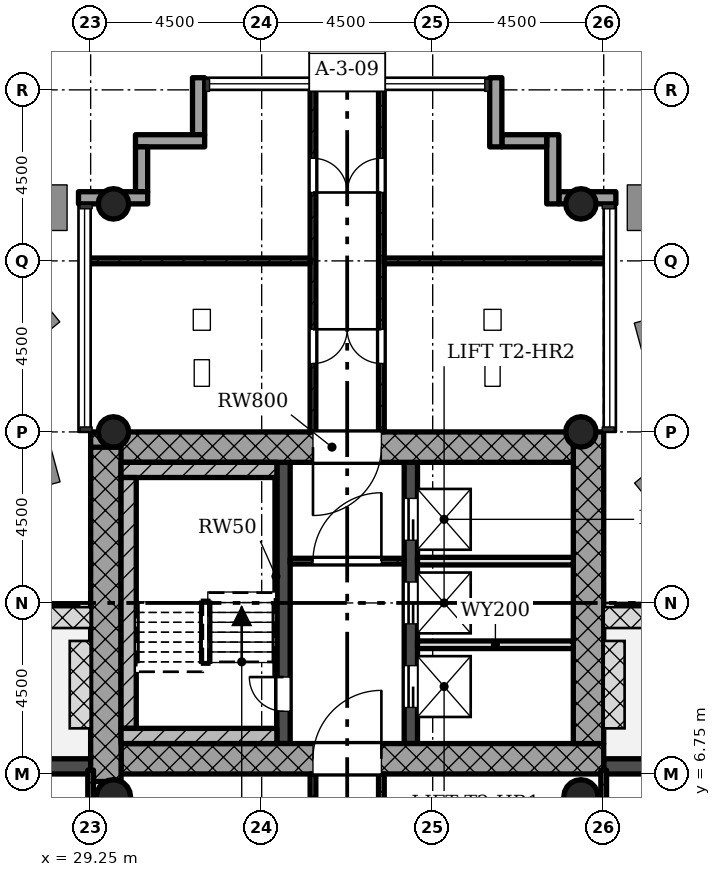
"""IFC4 building model, lengths in metres.
Left out: names, types, materials, properties, quantities, classifications, styles, units other than length and angle.
Written with IfcOpenShell. Run it as: python <this file> out.ifc"""

import sys

from ifc_helpers import new_model, si_unit, direction, frame, frame_2d, origin, origin_2d, place, context, subcontext, project, spatial, rectangle, hollow_circle, extrude, element, fill, save


model = new_model("IFC4")
c1 = context("Model", 3, precision=1e-05, world=origin(), true_north=direction((0.0, 1.0)))
c2 = subcontext(c1, "Body", "Model", "MODEL_VIEW")
j1 = project(units=[si_unit("LENGTHUNIT", "METRE"), si_unit("PLANEANGLEUNIT", "RADIAN")], contexts=[c1])
p1 = place(None, origin())
s1 = spatial("IfcSite", under=j1, at=p1, CompositionType="ELEMENT")
p2 = place(p1, origin())
s2 = spatial("IfcBuilding", under=s1, at=p2, CompositionType="ELEMENT")
p3 = place(p2, frame((0.0, 0.0, 128.7)))
s3 = spatial("IfcBuildingStorey", under=s2, at=p3, CompositionType="ELEMENT", Elevation=128.7)
p4 = place(p3, frame((30.05, 7.15, 0.0), z_axis=(0.0, 0.0, 1.0), x_axis=(1.0, 0.0, 0.0)))
e1 = element("IfcWall", 1, at=p4, inside=s3, PredefinedType="SHEAR", context=c2, shape_type="SweptSolid", body=[
    extrude(rectangle(XDim=12.7, YDim=0.8, at=frame_2d((6.35, 0.0))), origin(), (0.0, 0.0, 1.0), 5.0),
])
p5 = place(p4, frame((5.05, 0.0, 0.0)))
e2 = element("IfcOpeningElement", 2, at=p5, cuts=e1, PredefinedType="OPENING", context=c2, shape_type="SweptSolid", body=[
    extrude(rectangle(XDim=1.8, YDim=2.1, at=frame_2d((0.9, 1.05))), frame((0.0, 0.41, 0.0), z_axis=(0.0, -1.0, 0.0), x_axis=(1.0, 0.0, 0.0)), (0.0, 0.0, 1.0), 0.82),
])
p6 = place(p3, frame((42.35, 7.55, 0.0), z_axis=(0.0, 0.0, 1.0), x_axis=(0.0, 1.0, 0.0)))
e3 = element("IfcWall", 3, at=p6, inside=s3, PredefinedType="SHEAR", context=c2, shape_type="SweptSolid", body=[
    extrude(rectangle(XDim=8.2, YDim=0.8, at=frame_2d((4.1, 0.0))), origin(), (0.0, 0.0, 1.0), 5.0),
])
p7 = place(p3, frame((41.95, 15.35, 0.0), z_axis=(0.0, 0.0, 1.0), x_axis=(-1.0, 0.0, 0.0)))
e4 = element("IfcWall", 4, at=p7, inside=s3, PredefinedType="SHEAR", context=c2, shape_type="SweptSolid", body=[
    extrude(rectangle(XDim=12.7, YDim=0.8, at=frame_2d((6.35, 0.0))), origin(), (0.0, 0.0, 1.0), 5.0),
])
p8 = place(p7, frame((5.05, 0.0, 0.0)))
e5 = element("IfcOpeningElement", 5, at=p8, cuts=e4, PredefinedType="OPENING", context=c2, shape_type="SweptSolid", body=[
    extrude(rectangle(XDim=1.8, YDim=2.1, at=frame_2d((0.9, 1.05))), frame((0.0, 0.41, 0.0), z_axis=(0.0, -1.0, 0.0), x_axis=(1.0, 0.0, 0.0)), (0.0, 0.0, 1.0), 0.82),
])
p9 = place(p3, frame((29.65, 15.348, 0.0), z_axis=(0.0, 0.0, 1.0), x_axis=(0.0, -1.0, 0.0)))
e6 = element("IfcWall", 6, at=p9, inside=s3, PredefinedType="SHEAR", context=c2, shape_type="SweptSolid", body=[
    extrude(rectangle(XDim=8.796, YDim=0.8, at=frame_2d((4.398, 0.0))), origin(), (0.0, 0.0, 1.0), 5.0),
])
p10 = place(p3, frame((34.325, 7.55, 0.0), z_axis=(0.0, 0.0, 1.0), x_axis=(0.0, 1.0, 0.0)))
e7 = element("IfcWall", 7, at=p10, inside=s3, PredefinedType="SHEAR", context=c2, shape_type="SweptSolid", body=[
    extrude(rectangle(XDim=7.4, YDim=0.35, at=frame_2d((3.7, 0.0))), origin(), (0.0, 0.0, 1.0), 5.0),
])
p11 = place(p10, frame((0.85, 0.0, 0.0)))
e8 = element("IfcOpeningElement", 8, at=p11, cuts=e7, PredefinedType="OPENING", context=c2, shape_type="SweptSolid", body=[
    extrude(rectangle(XDim=0.9, YDim=2.1, at=frame_2d((0.45, 1.05))), frame((0.0, 0.185, 0.0), z_axis=(0.0, -1.0, 0.0), x_axis=(1.0, 0.0, 0.0)), (0.0, 0.0, 1.0), 0.37),
])
p12 = place(p3, frame((37.675, 7.55, 0.0), z_axis=(0.0, 0.0, 1.0), x_axis=(0.0, 1.0, 0.0)))
e9 = element("IfcWall", 9, at=p12, inside=s3, PredefinedType="SHEAR", context=c2, shape_type="SweptSolid", body=[
    extrude(rectangle(XDim=7.4, YDim=0.35, at=frame_2d((3.7, 0.0))), origin(), (0.0, 0.0, 1.0), 5.0),
])
p13 = place(p12, frame((0.95, 0.0, 0.0)))
e10 = element("IfcOpeningElement", 10, at=p13, cuts=e9, PredefinedType="OPENING", context=c2, shape_type="SweptSolid", body=[
    extrude(rectangle(XDim=1.1, YDim=2.1, at=frame_2d((0.55, 1.05))), frame((0.0, 0.185, 0.0), z_axis=(0.0, -1.0, 0.0), x_axis=(1.0, 0.0, 0.0)), (0.0, 0.0, 1.0), 0.37),
])
p14 = place(p12, frame((3.15, 0.0, 0.0)))
e11 = element("IfcOpeningElement", 11, at=p14, cuts=e9, PredefinedType="OPENING", context=c2, shape_type="SweptSolid", body=[
    extrude(rectangle(XDim=1.1, YDim=2.1, at=frame_2d((0.55, 1.05))), frame((0.0, 0.185, 0.0), z_axis=(0.0, -1.0, 0.0), x_axis=(1.0, 0.0, 0.0)), (0.0, 0.0, 1.0), 0.37),
])
p15 = place(p12, frame((5.35, 0.0, 0.0)))
e12 = element("IfcOpeningElement", 12, at=p15, cuts=e9, PredefinedType="OPENING", context=c2, shape_type="SweptSolid", body=[
    extrude(rectangle(XDim=1.1, YDim=2.1, at=frame_2d((0.55, 1.05))), frame((0.0, 0.185, 0.0), z_axis=(0.0, -1.0, 0.0), x_axis=(1.0, 0.0, 0.0)), (0.0, 0.0, 1.0), 0.37),
])
for number, where, z_axis, x_axis in (
    (13, (42.15, 15.75, 0.0), (0.0, 0.0, 1.0), (1.0, 0.0, 0.0)),
    (14, (29.85, 15.75, 0.0), (0.0, 0.0, 1.0), (1.0, 0.0, 0.0)),
    (15, (42.15, 21.75, 0.0), (0.0, 0.0, 1.0), (1.0, 0.0, 0.0)),
    (16, (29.85, 21.75, 0.0), (0.0, 0.0, 1.0), (1.0, 0.0, 0.0)),
):
    element("IfcColumn", number, at=place(p3, frame(where, z_axis=z_axis, x_axis=x_axis)), inside=s3, PredefinedType="COLUMN", context=c2, shape_type="SweptSolid", body=[
        extrude(hollow_circle(Radius=0.4, WallThickness=0.028, at=origin_2d()), origin(), (0.0, 0.0, 1.0), 5.0),
    ])
for number, where, z_axis, x_axis in (
    (17, (42.15, 6.15, 0.0), (0.0, 0.0, 1.0), (1.0, 0.0, 0.0)),
    (18, (29.85, 6.15, 0.0), (0.0, 0.0, 1.0), (1.0, 0.0, 0.0)),
):
    element("IfcColumn", number, at=place(p3, frame(where, z_axis=z_axis, x_axis=x_axis)), inside=s3, PredefinedType="COLUMN", context=c2, shape_type="SweptSolid", body=[
        extrude(hollow_circle(Radius=0.45, WallThickness=0.032, at=origin_2d()), origin(), (0.0, 0.0, 1.0), 5.0),
    ])
p16 = place(p3, frame((47.25, 6.95, -0.02), z_axis=(0.0, 0.0, 1.0), x_axis=(-1.0, 0.0, 0.0)))
e19 = element("IfcWall", 19, at=p16, inside=s3, PredefinedType="STANDARD", context=c2, shape_type="SweptSolid", body=[
    extrude(rectangle(XDim=4.5, YDim=0.4, at=frame_2d((2.25, 0.0))), origin(), (0.0, 0.0, 1.0), 4.72),
])
p17 = place(p16, frame((1.35, 0.0, 0.02)))
e20 = element("IfcOpeningElement", 20, at=p17, cuts=e19, PredefinedType="OPENING", context=c2, shape_type="SweptSolid", body=[
    extrude(rectangle(XDim=1.8, YDim=2.1, at=frame_2d((0.9, 1.05))), frame((0.0, 0.21, 0.0), z_axis=(0.0, -1.0, 0.0), x_axis=(1.0, 0.0, 0.0)), (0.0, 0.0, 1.0), 0.42),
])
p18 = place(p3, frame((43.07, 21.91, -0.3), z_axis=(0.0, 0.0, 1.0), x_axis=(-1.0, 0.0, 0.0)))
e21 = element("IfcWall", 21, at=p18, inside=s3, PredefinedType="STANDARD", context=c2, shape_type="SweptSolid", body=[
    extrude(rectangle(XDim=1.5, YDim=0.32, at=frame_2d((0.75, 0.0))), origin(), (0.0, 0.0, 1.0), 5.0),
])
p19 = place(p3, frame((41.41, 21.75, -0.3), z_axis=(0.0, 0.0, 1.0), x_axis=(0.0, 1.0, 0.0)))
e22 = element("IfcWall", 22, at=p19, inside=s3, PredefinedType="STANDARD", context=c2, shape_type="SweptSolid", body=[
    extrude(rectangle(XDim=1.82, YDim=0.32, at=frame_2d((0.91, 0.0))), origin(), (0.0, 0.0, 1.0), 5.0),
])
p20 = place(p3, frame((41.25, 23.41, -0.3), z_axis=(0.0, 0.0, 1.0), x_axis=(-1.0, 0.0, 0.0)))
e23 = element("IfcWall", 23, at=p20, inside=s3, PredefinedType="STANDARD", context=c2, shape_type="SweptSolid", body=[
    extrude(rectangle(XDim=1.18, YDim=0.32, at=frame_2d((0.59, 0.0))), origin(), (0.0, 0.0, 1.0), 5.0),
])
p21 = place(p3, frame((39.91, 23.25, -0.3), z_axis=(0.0, 0.0, 1.0), x_axis=(0.0, 1.0, 0.0)))
e24 = element("IfcWall", 24, at=p21, inside=s3, PredefinedType="STANDARD", context=c2, shape_type="SweptSolid", body=[
    extrude(rectangle(XDim=1.82, YDim=0.32, at=frame_2d((0.91, 0.0))), origin(), (0.0, 0.0, 1.0), 5.0),
])
p22 = place(p3, frame((32.09, 25.07, -0.3), z_axis=(0.0, 0.0, 1.0), x_axis=(0.0, -1.0, 0.0)))
e25 = element("IfcWall", 25, at=p22, inside=s3, PredefinedType="STANDARD", context=c2, shape_type="SweptSolid", body=[
    extrude(rectangle(XDim=1.5, YDim=0.32, at=frame_2d((0.75, 0.0))), origin(), (0.0, 0.0, 1.0), 5.0),
])
p23 = place(p3, frame((32.25, 23.41, -0.3), z_axis=(0.0, 0.0, 1.0), x_axis=(-1.0, 0.0, 0.0)))
e26 = element("IfcWall", 26, at=p23, inside=s3, PredefinedType="STANDARD", context=c2, shape_type="SweptSolid", body=[
    extrude(rectangle(XDim=1.82, YDim=0.32, at=frame_2d((0.91, 0.0))), origin(), (0.0, 0.0, 1.0), 5.0),
])
p24 = place(p3, frame((30.59, 23.25, -0.3), z_axis=(0.0, 0.0, 1.0), x_axis=(0.0, -1.0, 0.0)))
e27 = element("IfcWall", 27, at=p24, inside=s3, PredefinedType="STANDARD", context=c2, shape_type="SweptSolid", body=[
    extrude(rectangle(XDim=1.18, YDim=0.32, at=frame_2d((0.59, 0.0))), origin(), (0.0, 0.0, 1.0), 5.0),
])
p25 = place(p3, frame((30.75, 21.91, -0.3), z_axis=(0.0, 0.0, 1.0), x_axis=(-1.0, 0.0, 0.0)))
e28 = element("IfcWall", 28, at=p25, inside=s3, PredefinedType="STANDARD", context=c2, shape_type="SweptSolid", body=[
    extrude(rectangle(XDim=1.82, YDim=0.32, at=frame_2d((0.91, 0.0))), origin(), (0.0, 0.0, 1.0), 5.0),
])
p26 = place(p3, frame((29.25, 6.95, -0.02), z_axis=(0.0, 0.0, 1.0), x_axis=(-1.0, 0.0, 0.0)))
e29 = element("IfcWall", 29, at=p26, inside=s3, PredefinedType="STANDARD", context=c2, shape_type="SweptSolid", body=[
    extrude(rectangle(XDim=4.5, YDim=0.4, at=frame_2d((2.25, 0.0))), origin(), (0.0, 0.0, 1.0), 4.72),
])
p27 = place(p26, frame((1.35, 0.0, 0.02)))
e30 = element("IfcOpeningElement", 30, at=p27, cuts=e29, PredefinedType="OPENING", context=c2, shape_type="SweptSolid", body=[
    extrude(rectangle(XDim=1.8, YDim=2.1, at=frame_2d((0.9, 1.05))), frame((0.0, 0.21, 0.0), z_axis=(0.0, -1.0, 0.0), x_axis=(1.0, 0.0, 0.0)), (0.0, 0.0, 1.0), 0.42),
])
p28 = place(p3, frame((37.5, 12.35, 0.0), z_axis=(0.0, 0.0, 1.0), x_axis=(-1.0, 0.0, 0.0)))
e31 = element("IfcWall", 31, at=p28, inside=s3, PredefinedType="PARTITIONING", context=c2, shape_type="SweptSolid", body=[
    extrude(rectangle(XDim=3.0, YDim=0.15, at=frame_2d((1.5, 0.0))), origin(), (0.0, 0.0, 1.0), 4.58),
])
p29 = place(p28, frame((0.6, 0.0, 0.0)))
e32 = element("IfcOpeningElement", 32, at=p29, cuts=e31, PredefinedType="OPENING", context=c2, shape_type="SweptSolid", body=[
    extrude(rectangle(XDim=1.8, YDim=2.1, at=frame_2d((0.9, 1.05))), frame((0.0, 0.085, 0.0), z_axis=(0.0, -1.0, 0.0), x_axis=(1.0, 0.0, 0.0)), (0.0, 0.0, 1.0), 0.17),
])
for number, where, z_axis, x_axis in (
    (33, (41.95, 10.15, 0.0), (0.0, 0.0, 1.0), (-1.0, 0.0, 0.0)),
    (34, (41.95, 12.35, 0.0), (0.0, 0.0, 1.0), (-1.0, 0.0, 0.0)),
):
    element("IfcWall", number, at=place(p3, frame(where, z_axis=z_axis, x_axis=x_axis)), inside=s3, PredefinedType="SOLIDWALL", context=c2, shape_type="SweptSolid", body=[
        extrude(rectangle(XDim=4.1, YDim=0.2, at=frame_2d((2.05, 0.0))), origin(), (0.0, 0.0, 1.0), 4.58),
    ])
p30 = place(p3, frame((35.1, 0.9, 0.0), z_axis=(0.0, 0.0, 1.0), x_axis=(0.0, 1.0, 0.0)))
e35 = element("IfcWall", 35, at=p30, inside=s3, PredefinedType="PARTITIONING", context=c2, shape_type="SweptSolid", body=[
    extrude(rectangle(XDim=5.85, YDim=0.15, at=frame_2d((2.925, 0.0))), origin(), (0.0, 0.0, 1.0), 4.58),
])
p31 = place(p30, frame((2.475, 0.0, 0.0)))
e36 = element("IfcOpeningElement", 36, at=p31, cuts=e35, PredefinedType="OPENING", context=c2, shape_type="SweptSolid", body=[
    extrude(rectangle(XDim=0.9, YDim=2.1, at=frame_2d((0.45, 1.05))), frame((0.0, 0.085, 0.0), z_axis=(0.0, -1.0, 0.0), x_axis=(1.0, 0.0, 0.0)), (0.0, 0.0, 1.0), 0.17),
])
p32 = place(p3, frame((36.9, 0.9, 0.0), z_axis=(0.0, 0.0, 1.0), x_axis=(0.0, 1.0, 0.0)))
e37 = element("IfcWall", 37, at=p32, inside=s3, PredefinedType="PARTITIONING", context=c2, shape_type="SweptSolid", body=[
    extrude(rectangle(XDim=5.85, YDim=0.15, at=frame_2d((2.925, 0.0))), origin(), (0.0, 0.0, 1.0), 4.58),
])
p33 = place(p32, frame((2.475, 0.0, 0.0)))
e38 = element("IfcOpeningElement", 38, at=p33, cuts=e37, PredefinedType="OPENING", context=c2, shape_type="SweptSolid", body=[
    extrude(rectangle(XDim=0.9, YDim=2.1, at=frame_2d((0.45, 1.05))), frame((0.0, 0.085, 0.0), z_axis=(0.0, -1.0, 0.0), x_axis=(1.0, 0.0, 0.0)), (0.0, 0.0, 1.0), 0.17),
])
p34 = place(p3, frame((35.1, 15.75, 0.0), z_axis=(0.0, 0.0, 1.0), x_axis=(0.0, 1.0, 0.0)))
e39 = element("IfcWall", 39, at=p34, inside=s3, PredefinedType="PARTITIONING", context=c2, shape_type="SweptSolid", body=[
    extrude(rectangle(XDim=9.1, YDim=0.15, at=frame_2d((4.55, 0.0))), origin(), (0.0, 0.0, 1.0), 4.58),
])
p35 = place(p34, frame((1.8, 0.0, 0.0)))
e40 = element("IfcOpeningElement", 40, at=p35, cuts=e39, PredefinedType="OPENING", context=c2, shape_type="SweptSolid", body=[
    extrude(rectangle(XDim=0.9, YDim=2.1, at=frame_2d((0.45, 1.05))), frame((0.0, 0.085, 0.0), z_axis=(0.0, -1.0, 0.0), x_axis=(1.0, 0.0, 0.0)), (0.0, 0.0, 1.0), 0.17),
])
p36 = place(p34, frame((6.3, 0.0, 0.0)))
e41 = element("IfcOpeningElement", 41, at=p36, cuts=e39, PredefinedType="OPENING", context=c2, shape_type="SweptSolid", body=[
    extrude(rectangle(XDim=0.9, YDim=2.1, at=frame_2d((0.45, 1.05))), frame((0.0, 0.085, 0.0), z_axis=(0.0, -1.0, 0.0), x_axis=(1.0, 0.0, 0.0)), (0.0, 0.0, 1.0), 0.17),
])
p37 = place(p3, frame((35.025, 20.25, 0.0), z_axis=(0.0, 0.0, 1.0), x_axis=(-1.0, 0.0, 0.0)))
e42 = element("IfcWall", 42, at=p37, inside=s3, PredefinedType="PARTITIONING", context=c2, shape_type="SweptSolid", body=[
    extrude(rectangle(XDim=5.875, YDim=0.15, at=frame_2d((2.938, 0.0))), origin(), (0.0, 0.0, 1.0), 4.58),
])
p38 = place(p3, frame((36.9, 15.75, 0.0), z_axis=(0.0, 0.0, 1.0), x_axis=(0.0, 1.0, 0.0)))
e43 = element("IfcWall", 43, at=p38, inside=s3, PredefinedType="PARTITIONING", context=c2, shape_type="SweptSolid", body=[
    extrude(rectangle(XDim=9.1, YDim=0.15, at=frame_2d((4.55, 0.0))), origin(), (0.0, 0.0, 1.0), 4.58),
])
p39 = place(p38, frame((1.8, 0.0, 0.0)))
e44 = element("IfcOpeningElement", 44, at=p39, cuts=e43, PredefinedType="OPENING", context=c2, shape_type="SweptSolid", body=[
    extrude(rectangle(XDim=0.9, YDim=2.1, at=frame_2d((0.45, 1.05))), frame((0.0, 0.085, 0.0), z_axis=(0.0, -1.0, 0.0), x_axis=(1.0, 0.0, 0.0)), (0.0, 0.0, 1.0), 0.17),
])
p40 = place(p38, frame((6.3, 0.0, 0.0)))
e45 = element("IfcOpeningElement", 45, at=p40, cuts=e43, PredefinedType="OPENING", context=c2, shape_type="SweptSolid", body=[
    extrude(rectangle(XDim=0.9, YDim=2.1, at=frame_2d((0.45, 1.05))), frame((0.0, 0.085, 0.0), z_axis=(0.0, -1.0, 0.0), x_axis=(1.0, 0.0, 0.0)), (0.0, 0.0, 1.0), 0.17),
])
p41 = place(p3, frame((36.975, 20.25, 0.0), z_axis=(0.0, 0.0, 1.0), x_axis=(1.0, 0.0, 0.0)))
e46 = element("IfcWall", 46, at=p41, inside=s3, PredefinedType="PARTITIONING", context=c2, shape_type="SweptSolid", body=[
    extrude(rectangle(XDim=5.875, YDim=0.15, at=frame_2d((2.938, 0.0))), origin(), (0.0, 0.0, 1.0), 4.58),
])
p42 = place(p3, frame((29.25, -6.85, 0.0), z_axis=(0.0, 0.0, 1.0), x_axis=(0.0, 1.0, 0.0)))
e47 = element("IfcWall", 47, at=p42, inside=s3, PredefinedType="PARTITIONING", context=c2, shape_type="SweptSolid", body=[
    extrude(rectangle(XDim=13.7, YDim=0.15, at=frame_2d((6.85, 0.0))), origin(), (0.0, 0.0, 1.0), 4.58),
])
p43 = place(p42, frame((5.95, 0.0, 0.0)))
e48 = element("IfcOpeningElement", 48, at=p43, cuts=e47, PredefinedType="OPENING", context=c2, shape_type="SweptSolid", body=[
    extrude(rectangle(XDim=1.8, YDim=2.1, at=frame_2d((0.9, 1.05))), frame((0.0, 0.085, 0.0), z_axis=(0.0, -1.0, 0.0), x_axis=(1.0, 0.0, 0.0)), (0.0, 0.0, 1.0), 0.17),
])
p44 = place(p3, frame((42.75, -6.85, 0.0), z_axis=(0.0, 0.0, 1.0), x_axis=(0.0, 1.0, 0.0)))
e49 = element("IfcWall", 49, at=p44, inside=s3, PredefinedType="PARTITIONING", context=c2, shape_type="SweptSolid", body=[
    extrude(rectangle(XDim=13.7, YDim=0.15, at=frame_2d((6.85, 0.0))), origin(), (0.0, 0.0, 1.0), 4.58),
])
p45 = place(p44, frame((5.95, 0.0, 0.0)))
e50 = element("IfcOpeningElement", 50, at=p45, cuts=e49, PredefinedType="OPENING", context=c2, shape_type="SweptSolid", body=[
    extrude(rectangle(XDim=1.8, YDim=2.1, at=frame_2d((0.9, 1.05))), frame((0.0, 0.085, 0.0), z_axis=(0.0, -1.0, 0.0), x_axis=(1.0, 0.0, 0.0)), (0.0, 0.0, 1.0), 0.17),
])
p46 = place(p3, frame((34.15, 14.75, 0.0), z_axis=(0.0, 0.0, 1.0), x_axis=(-1.0, 0.0, 0.0)))
e51 = element("IfcWall", 51, at=p46, inside=s3, PredefinedType="SHEAR", context=c2, shape_type="SweptSolid", body=[
    extrude(rectangle(XDim=4.1, YDim=0.4, at=frame_2d((2.05, 0.0))), origin(), (0.0, 0.0, 1.0), 5.0),
])
p47 = place(p3, frame((30.25, 7.95, 0.0), z_axis=(0.0, 0.0, 1.0), x_axis=(0.0, 1.0, 0.0)))
e52 = element("IfcWall", 52, at=p47, inside=s3, PredefinedType="SHEAR", context=c2, shape_type="SweptSolid", body=[
    extrude(rectangle(XDim=6.6, YDim=0.4, at=frame_2d((3.3, 0.0))), origin(), (0.0, 0.0, 1.0), 5.0),
])
p48 = place(p3, frame((34.15, 7.75, 0.0), z_axis=(0.0, 0.0, 1.0), x_axis=(-1.0, 0.0, 0.0)))
e53 = element("IfcWall", 53, at=p48, inside=s3, PredefinedType="SHEAR", context=c2, shape_type="SweptSolid", body=[
    extrude(rectangle(XDim=4.1, YDim=0.4, at=frame_2d((2.05, 0.0))), origin(), (0.0, 0.0, 1.0), 5.0),
])
p49 = place(p3, frame((34.125, 9.35, 0.0), z_axis=(0.0, 0.0, 1.0), x_axis=(0.0, 1.0, 0.0)))
e54 = element("IfcWall", 54, at=p49, inside=s3, PredefinedType="SHEAR", context=c2, shape_type="SweptSolid", body=[
    extrude(rectangle(XDim=5.2, YDim=0.05, at=frame_2d((2.6, 0.0))), origin(), (0.0, 0.0, 1.0), 5.0),
])
p50 = place(p29, origin())
e55 = element("IfcDoor", 55, at=p50, inside=s3, OperationType="SINGLE_SWING_LEFT", PredefinedType="DOOR", context=c2, shape_type="SweptSolid", body=[
    extrude(rectangle(XDim=1.8, YDim=2.1, at=frame_2d((0.9, 1.05))), frame((0.0, 0.025, 0.0), z_axis=(0.0, -1.0, 0.0), x_axis=(1.0, 0.0, 0.0)), (0.0, 0.0, 1.0), 0.05),
])
fill(e32, e55)
p51 = place(p35, origin())
e56 = element("IfcDoor", 56, at=p51, inside=s3, OperationType="SINGLE_SWING_RIGHT", PredefinedType="DOOR", context=c2, shape_type="SweptSolid", body=[
    extrude(rectangle(XDim=0.9, YDim=2.1, at=frame_2d((0.45, 1.05))), frame((0.0, 0.025, 0.0), z_axis=(0.0, -1.0, 0.0), x_axis=(1.0, 0.0, 0.0)), (0.0, 0.0, 1.0), 0.05),
])
fill(e40, e56)
p52 = place(p36, origin())
e57 = element("IfcDoor", 57, at=p52, inside=s3, OperationType="SINGLE_SWING_LEFT", PredefinedType="DOOR", context=c2, shape_type="SweptSolid", body=[
    extrude(rectangle(XDim=0.9, YDim=2.1, at=frame_2d((0.45, 1.05))), frame((0.0, 0.025, 0.0), z_axis=(0.0, -1.0, 0.0), x_axis=(1.0, 0.0, 0.0)), (0.0, 0.0, 1.0), 0.05),
])
fill(e41, e57)
p53 = place(p39, origin())
e58 = element("IfcDoor", 58, at=p53, inside=s3, OperationType="SINGLE_SWING_LEFT", PredefinedType="DOOR", context=c2, shape_type="SweptSolid", body=[
    extrude(rectangle(XDim=0.9, YDim=2.1, at=frame_2d((0.45, 1.05))), frame((0.0, 0.025, 0.0), z_axis=(0.0, -1.0, 0.0), x_axis=(1.0, 0.0, 0.0)), (0.0, 0.0, 1.0), 0.05),
])
fill(e44, e58)
p54 = place(p40, origin())
e59 = element("IfcDoor", 59, at=p54, inside=s3, OperationType="SINGLE_SWING_RIGHT", PredefinedType="DOOR", context=c2, shape_type="SweptSolid", body=[
    extrude(rectangle(XDim=0.9, YDim=2.1, at=frame_2d((0.45, 1.05))), frame((0.0, 0.025, 0.0), z_axis=(0.0, -1.0, 0.0), x_axis=(1.0, 0.0, 0.0)), (0.0, 0.0, 1.0), 0.05),
])
fill(e45, e59)
p55 = place(p11, origin())
e60 = element("IfcDoor", 60, at=p55, inside=s3, OperationType="SINGLE_SWING_LEFT", PredefinedType="DOOR", context=c2, shape_type="SweptSolid", body=[
    extrude(rectangle(XDim=0.9, YDim=2.1, at=frame_2d((0.45, 1.05))), frame((0.0, 0.025, 0.0), z_axis=(0.0, -1.0, 0.0), x_axis=(1.0, 0.0, 0.0)), (0.0, 0.0, 1.0), 0.05),
])
fill(e8, e60)
p56 = place(p13, origin())
e61 = element("IfcDoor", 61, at=p56, inside=s3, OperationType="SLIDING_TO_LEFT", PredefinedType="DOOR", context=c2, shape_type="SweptSolid", body=[
    extrude(rectangle(XDim=1.1, YDim=2.1, at=frame_2d((0.55, 1.05))), frame((0.0, 0.025, 0.0), z_axis=(0.0, -1.0, 0.0), x_axis=(1.0, 0.0, 0.0)), (0.0, 0.0, 1.0), 0.05),
])
fill(e10, e61)
p57 = place(p14, origin())
e62 = element("IfcDoor", 62, at=p57, inside=s3, OperationType="SLIDING_TO_LEFT", PredefinedType="DOOR", context=c2, shape_type="SweptSolid", body=[
    extrude(rectangle(XDim=1.1, YDim=2.1, at=frame_2d((0.55, 1.05))), frame((0.0, 0.025, 0.0), z_axis=(0.0, -1.0, 0.0), x_axis=(1.0, 0.0, 0.0)), (0.0, 0.0, 1.0), 0.05),
])
fill(e11, e62)
p58 = place(p15, origin())
e63 = element("IfcDoor", 63, at=p58, inside=s3, OperationType="SLIDING_TO_LEFT", PredefinedType="DOOR", context=c2, shape_type="SweptSolid", body=[
    extrude(rectangle(XDim=1.1, YDim=2.1, at=frame_2d((0.55, 1.05))), frame((0.0, 0.025, 0.0), z_axis=(0.0, -1.0, 0.0), x_axis=(1.0, 0.0, 0.0)), (0.0, 0.0, 1.0), 0.05),
])
fill(e12, e63)
p59 = place(p5, origin())
e64 = element("IfcDoor", 64, at=p59, inside=s3, OperationType="SINGLE_SWING_LEFT", PredefinedType="DOOR", context=c2, shape_type="SweptSolid", body=[
    extrude(rectangle(XDim=1.8, YDim=2.1, at=frame_2d((0.9, 1.05))), frame((0.0, 0.025, 0.0), z_axis=(0.0, -1.0, 0.0), x_axis=(1.0, 0.0, 0.0)), (0.0, 0.0, 1.0), 0.05),
])
fill(e2, e64)
p60 = place(p8, origin())
e65 = element("IfcDoor", 65, at=p60, inside=s3, OperationType="SINGLE_SWING_LEFT", PredefinedType="DOOR", context=c2, shape_type="SweptSolid", body=[
    extrude(rectangle(XDim=1.8, YDim=2.1, at=frame_2d((0.9, 1.05))), frame((0.0, 0.025, 0.0), z_axis=(0.0, -1.0, 0.0), x_axis=(1.0, 0.0, 0.0)), (0.0, 0.0, 1.0), 0.05),
])
fill(e5, e65)
save(model, sys.argv[1])
